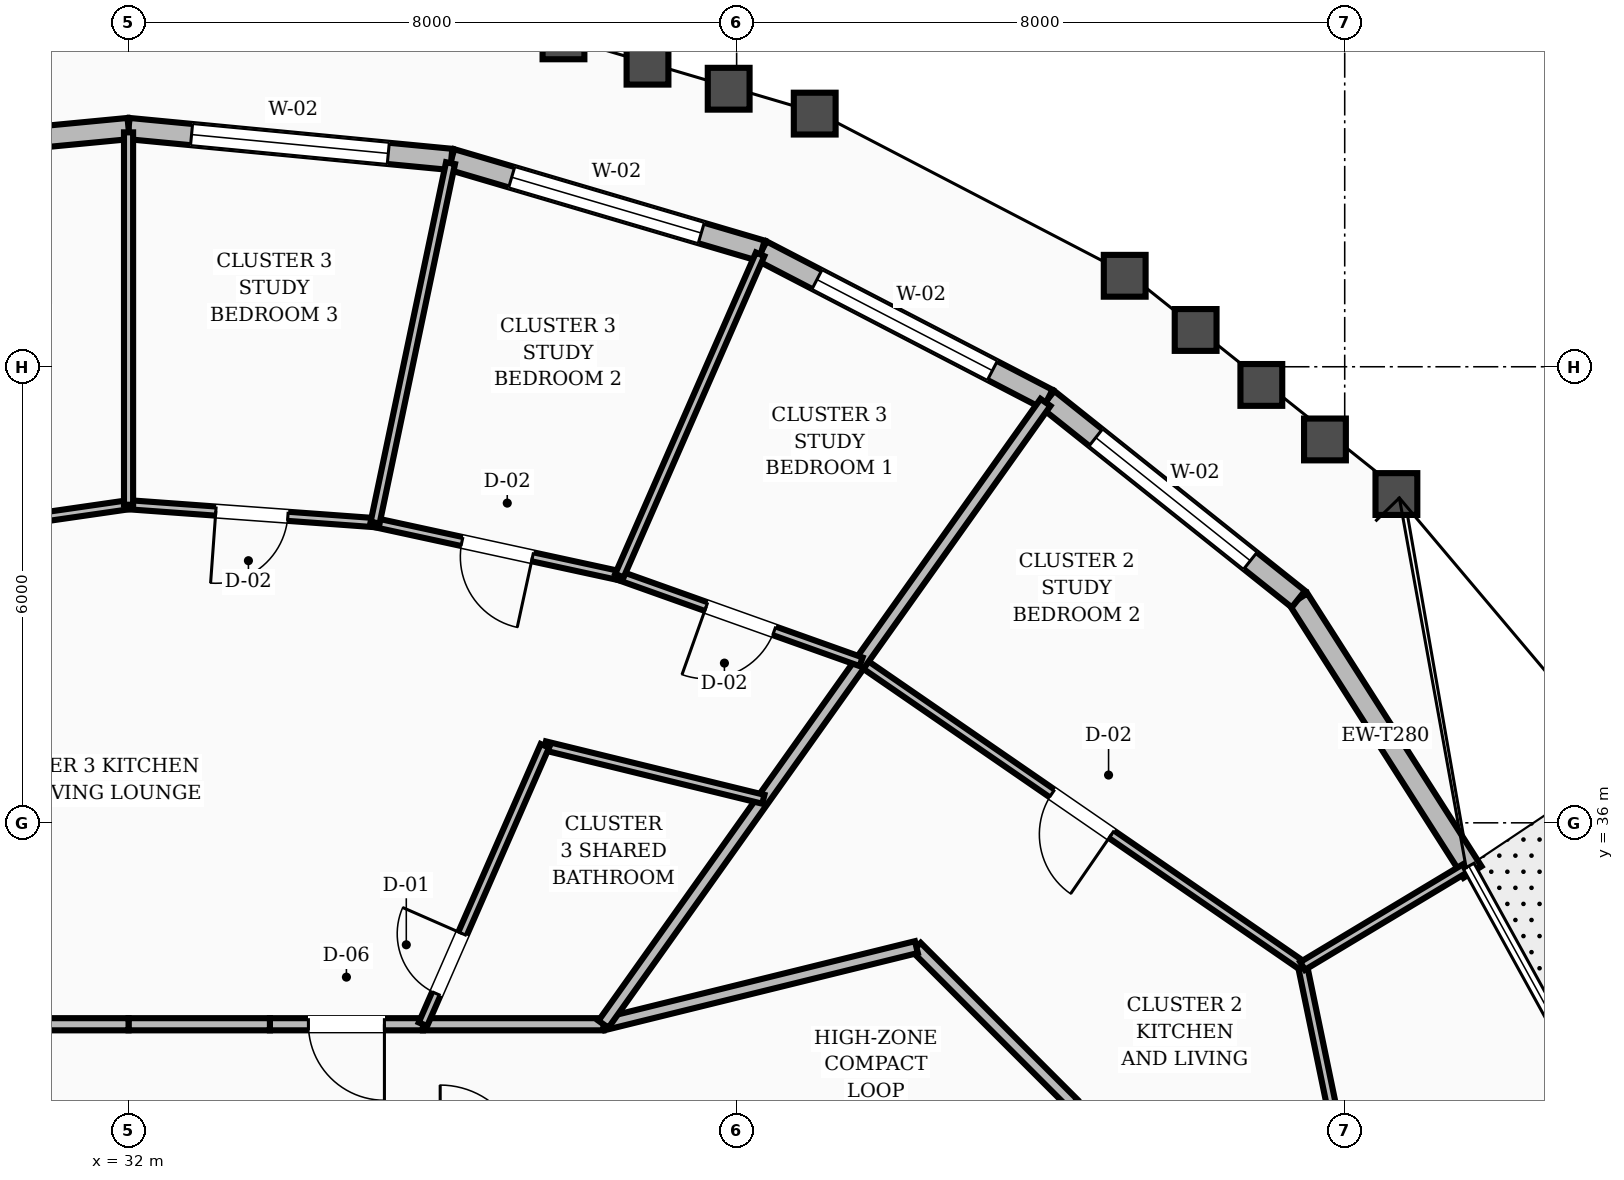
"""IFC4 building model, lengths in metres.
Left out: names, types, materials, properties, quantities, classifications, styles, units other than length and angle.
Written with IfcOpenShell. Run it as: python <this file> out.ifc"""

import sys

from ifc_helpers import new_model, si_unit, direction, frame, frame_2d, origin, place, context, subcontext, project, spatial, rectangle, extrude, element, fill, save


model = new_model("IFC4")
c1 = context("Model", 3, precision=1e-05, world=origin(), true_north=direction((0.0, 1.0)))
c2 = subcontext(c1, "Body", "Model", "MODEL_VIEW")
j1 = project(units=[si_unit("LENGTHUNIT", "METRE"), si_unit("PLANEANGLEUNIT", "RADIAN")], contexts=[c1])
p1 = place(None, origin())
s1 = spatial("IfcSite", under=j1, at=p1, CompositionType="ELEMENT")
p2 = place(p1, origin())
s2 = spatial("IfcBuilding", under=s1, at=p2, CompositionType="ELEMENT")
p3 = place(p2, frame((0.0, 0.0, 240.0)))
s3 = spatial("IfcBuildingStorey", under=s2, at=p3, CompositionType="ELEMENT", Elevation=240.0)
p4 = place(p3, frame((49.681, 35.353, 0.0), z_axis=(0.0, 0.0, 1.0), x_axis=(-0.537776362765, 0.843087530243, 0.0)))
e1 = element("IfcWall", 1, at=p4, inside=s3, PredefinedType="STANDARD", context=c2, shape_type="SweptSolid", body=[
    extrude(rectangle(XDim=4.26, YDim=0.28, at=frame_2d((2.13, 0.0))), origin(), (0.0, 0.0, 1.0), 2.88),
])
p5 = place(p3, frame((47.39, 38.944, 0.0), z_axis=(0.0, 0.0, 1.0), x_axis=(-0.782030895384, 0.623239663906, 0.0)))
e2 = element("IfcWall", 2, at=p5, inside=s3, PredefinedType="STANDARD", context=c2, shape_type="SweptSolid", body=[
    extrude(rectangle(XDim=4.217, YDim=0.28, at=frame_2d((2.109, 0.0))), origin(), (0.0, 0.0, 1.0), 2.88),
])
p6 = place(p5, frame((0.809, 0.0, 0.8)))
e3 = element("IfcOpeningElement", 3, at=p6, cuts=e2, PredefinedType="OPENING", context=c2, shape_type="SweptSolid", body=[
    extrude(rectangle(XDim=2.6, YDim=1.65, at=frame_2d((1.3, 0.825))), frame((0.0, 0.15, 0.0), z_axis=(0.0, -1.0, 0.0), x_axis=(1.0, 0.0, 0.0)), (0.0, 0.0, 1.0), 0.3),
])
p7 = place(p3, frame((44.092, 41.572, 0.0), z_axis=(0.0, 0.0, 1.0), x_axis=(-0.887588000353, 0.460638189504, 0.0)))
e4 = element("IfcWall", 4, at=p7, inside=s3, PredefinedType="STANDARD", context=c2, shape_type="SweptSolid", body=[
    extrude(rectangle(XDim=4.24, YDim=0.28, at=frame_2d((2.12, 0.0))), origin(), (0.0, 0.0, 1.0), 2.88),
])
p8 = place(p7, frame((0.82, 0.0, 0.8)))
e5 = element("IfcOpeningElement", 5, at=p8, cuts=e4, PredefinedType="OPENING", context=c2, shape_type="SweptSolid", body=[
    extrude(rectangle(XDim=2.6, YDim=1.65, at=frame_2d((1.3, 0.825))), frame((0.0, 0.15, 0.0), z_axis=(0.0, -1.0, 0.0), x_axis=(1.0, 0.0, 0.0)), (0.0, 0.0, 1.0), 0.3),
])
p9 = place(p3, frame((40.329, 43.525, 0.0), z_axis=(0.0, 0.0, 1.0), x_axis=(-0.95925857755, 0.28252961154, 0.0)))
e6 = element("IfcWall", 6, at=p9, inside=s3, PredefinedType="STANDARD", context=c2, shape_type="SweptSolid", body=[
    extrude(rectangle(XDim=4.257, YDim=0.28, at=frame_2d((2.128, 0.0))), origin(), (0.0, 0.0, 1.0), 2.88),
])
p10 = place(p9, frame((0.828, 0.0, 0.8)))
e7 = element("IfcOpeningElement", 7, at=p10, cuts=e6, PredefinedType="OPENING", context=c2, shape_type="SweptSolid", body=[
    extrude(rectangle(XDim=2.6, YDim=1.65, at=frame_2d((1.3, 0.825))), frame((0.0, 0.15, 0.0), z_axis=(0.0, -1.0, 0.0), x_axis=(1.0, 0.0, 0.0)), (0.0, 0.0, 1.0), 0.3),
])
p11 = place(p3, frame((36.246, 44.728, 0.0), z_axis=(0.0, 0.0, 1.0), x_axis=(-0.995459644973, 0.09518453252, 0.0)))
e8 = element("IfcWall", 8, at=p11, inside=s3, PredefinedType="STANDARD", context=c2, shape_type="SweptSolid", body=[
    extrude(rectangle(XDim=4.265, YDim=0.28, at=frame_2d((2.133, 0.0))), origin(), (0.0, 0.0, 1.0), 2.88),
])
p12 = place(p11, frame((0.833, 0.0, 0.8)))
e9 = element("IfcOpeningElement", 9, at=p12, cuts=e8, PredefinedType="OPENING", context=c2, shape_type="SweptSolid", body=[
    extrude(rectangle(XDim=2.6, YDim=1.65, at=frame_2d((1.3, 0.825))), frame((0.0, 0.15, 0.0), z_axis=(0.0, -1.0, 0.0), x_axis=(1.0, 0.0, 0.0)), (0.0, 0.0, 1.0), 0.3),
])
p13 = place(p3, frame((32.0, 45.134, 0.0), z_axis=(0.0, 0.0, 1.0), x_axis=(-0.995459644973, -0.09518453252, 0.0)))
e10 = element("IfcWall", 10, at=p13, inside=s3, PredefinedType="STANDARD", context=c2, shape_type="SweptSolid", body=[
    extrude(rectangle(XDim=4.265, YDim=0.28, at=frame_2d((2.133, 0.0))), origin(), (0.0, 0.0, 1.0), 2.88),
])
p14 = place(p3, frame((44.427, 32.303, 0.0), z_axis=(0.0, 0.0, 1.0), x_axis=(-0.707106781187, 0.707106781187, 0.0)))
e11 = element("IfcWall", 11, at=p14, inside=s3, PredefinedType="SOLIDWALL", context=c2, shape_type="SweptSolid", body=[
    extrude(rectangle(XDim=2.916, YDim=0.16, at=frame_2d((1.458, 0.0))), origin(), (0.0, 0.0, 1.0), 2.87),
])
p15 = place(p3, frame((42.365, 34.365, 0.0), z_axis=(0.0, 0.0, 1.0), x_axis=(-0.970939799552, -0.239323850978, 0.0)))
e12 = element("IfcWall", 12, at=p15, inside=s3, PredefinedType="SOLIDWALL", context=c2, shape_type="SweptSolid", body=[
    extrude(rectangle(XDim=4.241, YDim=0.16, at=frame_2d((2.12, 0.0))), origin(), (0.0, 0.0, 1.0), 2.87),
])
p16 = place(p3, frame((38.248, 33.35, 0.0), z_axis=(0.0, 0.0, 1.0), x_axis=(-1.0, 0.0, 0.0)))
e13 = element("IfcWall", 13, at=p16, inside=s3, PredefinedType="SOLIDWALL", context=c2, shape_type="SweptSolid", body=[
    extrude(rectangle(XDim=2.375, YDim=0.16, at=frame_2d((1.188, 0.0))), origin(), (0.0, 0.0, 1.0), 2.87),
])
p17 = place(p3, frame((35.873, 33.35, 0.0), z_axis=(0.0, 0.0, 1.0), x_axis=(-1.0, 0.0, 0.0)))
e14 = element("IfcWall", 14, at=p17, inside=s3, PredefinedType="SOLIDWALL", context=c2, shape_type="SweptSolid", body=[
    extrude(rectangle(XDim=2.013, YDim=0.16, at=frame_2d((1.006, 0.0))), origin(), (0.0, 0.0, 1.0), 2.87),
])
p18 = place(p17, frame((0.507, 0.0, 0.0)))
e15 = element("IfcOpeningElement", 15, at=p18, cuts=e14, PredefinedType="OPENING", context=c2, shape_type="SweptSolid", body=[
    extrude(rectangle(XDim=1.0, YDim=2.1, at=frame_2d((0.5, 1.05))), frame((0.0, 0.09, 0.0), z_axis=(0.0, -1.0, 0.0), x_axis=(1.0, 0.0, 0.0)), (0.0, 0.0, 1.0), 0.18),
])
for number, where, z_axis, x_axis in (
    (16, (33.86, 33.35, 0.0), (0.0, 0.0, 1.0), (-1.0, 0.0, 0.0)),
    (17, (32.0, 33.35, 0.0), (0.0, 0.0, 1.0), (-1.0, 0.0, 0.0)),
):
    element("IfcWall", number, at=place(p3, frame(where, z_axis=z_axis, x_axis=x_axis)), inside=s3, PredefinedType="SOLIDWALL", context=c2, shape_type="SweptSolid", body=[
        extrude(rectangle(XDim=1.86, YDim=0.16, at=frame_2d((0.93, 0.0))), origin(), (0.0, 0.0, 1.0), 2.87),
    ])
p19 = place(p3, frame((49.541, 24.0, 0.0), z_axis=(0.0, 0.0, 1.0), x_axis=(-0.202796260228, 0.979220954043, 0.0)))
e18 = element("IfcWall", 18, at=p19, inside=s3, PredefinedType="PARTITIONING", context=c2, shape_type="SweptSolid", body=[
    extrude(rectangle(XDim=10.332, YDim=0.12, at=frame_2d((5.166, 0.0))), origin(), (0.0, 0.0, 1.0), 2.87),
])
p20 = place(p19, frame((6.561, 0.0, 0.0)))
e19 = element("IfcOpeningElement", 19, at=p20, cuts=e18, PredefinedType="OPENING", context=c2, shape_type="SweptSolid", body=[
    extrude(rectangle(XDim=0.95, YDim=2.1, at=frame_2d((0.475, 1.05))), frame((0.0, 0.07, 0.0), z_axis=(0.0, -1.0, 0.0), x_axis=(1.0, 0.0, 0.0)), (0.0, 0.0, 1.0), 0.14),
])
p21 = place(p3, frame((47.446, 34.117, 0.0), z_axis=(0.0, 0.0, 1.0), x_axis=(-0.823453694919, 0.567383479072, 0.0)))
e20 = element("IfcWall", 20, at=p21, inside=s3, PredefinedType="PARTITIONING", context=c2, shape_type="SweptSolid", body=[
    extrude(rectangle(XDim=7.053, YDim=0.12, at=frame_2d((3.527, 0.0))), origin(), (0.0, 0.0, 1.0), 2.87),
])
p22 = place(p21, frame((3.052, 0.0, 0.0)))
e21 = element("IfcOpeningElement", 21, at=p22, cuts=e20, PredefinedType="OPENING", context=c2, shape_type="SweptSolid", body=[
    extrude(rectangle(XDim=0.95, YDim=2.1, at=frame_2d((0.475, 1.05))), frame((0.0, 0.07, 0.0), z_axis=(0.0, -1.0, 0.0), x_axis=(1.0, 0.0, 0.0)), (0.0, 0.0, 1.0), 0.14),
])
p23 = place(p3, frame((47.446, 34.117, 0.0), z_axis=(0.0, 0.0, 1.0), x_axis=(0.85718258358, 0.515012639075, 0.0)))
e22 = element("IfcWall", 22, at=p23, inside=s3, PredefinedType="PARTITIONING", context=c2, shape_type="SweptSolid", body=[
    extrude(rectangle(XDim=2.5, YDim=0.12, at=frame_2d((1.25, 0.0))), origin(), (0.0, 0.0, 1.0), 2.87),
])
p24 = place(p3, frame((38.248, 33.35, 0.0), z_axis=(0.0, 0.0, 1.0), x_axis=(0.579377676694, 0.815059205058, 0.0)))
e23 = element("IfcWall", 23, at=p24, inside=s3, PredefinedType="SOLIDWALL", context=c2, shape_type="SweptSolid", body=[
    extrude(rectangle(XDim=10.038, YDim=0.16, at=frame_2d((5.019, 0.0))), origin(), (0.0, 0.0, 1.0), 2.87),
])
p25 = place(p3, frame((40.352, 36.31, 0.0), z_axis=(0.0, 0.0, 1.0), x_axis=(-0.971357969052, 0.237620908084, 0.0)))
e24 = element("IfcWall", 24, at=p25, inside=s3, PredefinedType="PARTITIONING", context=c2, shape_type="SweptSolid", body=[
    extrude(rectangle(XDim=2.959, YDim=0.12, at=frame_2d((1.479, 0.0))), origin(), (0.0, 0.0, 1.0), 2.87),
])
p26 = place(p3, frame((35.873, 33.35, 0.0), z_axis=(0.0, 0.0, 1.0), x_axis=(0.401215916975, 0.915983508566, 0.0)))
e25 = element("IfcWall", 25, at=p26, inside=s3, PredefinedType="PARTITIONING", context=c2, shape_type="SweptSolid", body=[
    extrude(rectangle(XDim=3.999, YDim=0.12, at=frame_2d((2.0, 0.0))), origin(), (0.0, 0.0, 1.0), 2.87),
])
p27 = place(p26, frame((0.44, 0.0, 0.0)))
e26 = element("IfcOpeningElement", 26, at=p27, cuts=e25, PredefinedType="OPENING", context=c2, shape_type="SweptSolid", body=[
    extrude(rectangle(XDim=0.86, YDim=2.1, at=frame_2d((0.43, 1.05))), frame((0.0, 0.07, 0.0), z_axis=(0.0, -1.0, 0.0), x_axis=(1.0, 0.0, 0.0)), (0.0, 0.0, 1.0), 0.14),
])
p28 = place(p3, frame((41.637, 38.119, 0.0), z_axis=(0.0, 0.0, 1.0), x_axis=(-0.942011593526, 0.335580329671, 0.0)))
e27 = element("IfcWall", 27, at=p28, inside=s3, PredefinedType="PARTITIONING", context=c2, shape_type="SweptSolid", body=[
    extrude(rectangle(XDim=3.376, YDim=0.12, at=frame_2d((1.688, 0.0))), origin(), (0.0, 0.0, 1.0), 2.87),
])
p29 = place(p28, frame((1.213, 0.0, 0.0)))
e28 = element("IfcOpeningElement", 28, at=p29, cuts=e27, PredefinedType="OPENING", context=c2, shape_type="SweptSolid", body=[
    extrude(rectangle(XDim=0.95, YDim=2.1, at=frame_2d((0.475, 1.05))), frame((0.0, 0.07, 0.0), z_axis=(0.0, -1.0, 0.0), x_axis=(1.0, 0.0, 0.0)), (0.0, 0.0, 1.0), 0.14),
])
p30 = place(p3, frame((38.458, 39.252, 0.0), z_axis=(0.0, 0.0, 1.0), x_axis=(-0.977245996874, 0.21210907947, 0.0)))
e29 = element("IfcWall", 29, at=p30, inside=s3, PredefinedType="PARTITIONING", context=c2, shape_type="SweptSolid", body=[
    extrude(rectangle(XDim=3.288, YDim=0.12, at=frame_2d((1.644, 0.0))), origin(), (0.0, 0.0, 1.0), 2.87),
])
p31 = place(p30, frame((1.169, 0.0, 0.0)))
e30 = element("IfcOpeningElement", 30, at=p31, cuts=e29, PredefinedType="OPENING", context=c2, shape_type="SweptSolid", body=[
    extrude(rectangle(XDim=0.95, YDim=2.1, at=frame_2d((0.475, 1.05))), frame((0.0, 0.07, 0.0), z_axis=(0.0, -1.0, 0.0), x_axis=(1.0, 0.0, 0.0)), (0.0, 0.0, 1.0), 0.14),
])
p32 = place(p3, frame((38.458, 39.252, 0.0), z_axis=(0.0, 0.0, 1.0), x_axis=(0.401165666386, 0.916005517512, 0.0)))
e31 = element("IfcWall", 31, at=p32, inside=s3, PredefinedType="PARTITIONING", context=c2, shape_type="SweptSolid", body=[
    extrude(rectangle(XDim=4.615, YDim=0.12, at=frame_2d((2.308, 0.0))), origin(), (0.0, 0.0, 1.0), 2.87),
])
p33 = place(p3, frame((35.244, 39.949, 0.0), z_axis=(0.0, 0.0, 1.0), x_axis=(-0.997373019742, 0.072436589452, 0.0)))
e32 = element("IfcWall", 32, at=p33, inside=s3, PredefinedType="PARTITIONING", context=c2, shape_type="SweptSolid", body=[
    extrude(rectangle(XDim=3.252, YDim=0.12, at=frame_2d((1.626, 0.0))), origin(), (0.0, 0.0, 1.0), 2.87),
])
p34 = place(p33, frame((1.151, 0.0, 0.0)))
e33 = element("IfcOpeningElement", 33, at=p34, cuts=e32, PredefinedType="OPENING", context=c2, shape_type="SweptSolid", body=[
    extrude(rectangle(XDim=0.95, YDim=2.1, at=frame_2d((0.475, 1.05))), frame((0.0, 0.07, 0.0), z_axis=(0.0, -1.0, 0.0), x_axis=(1.0, 0.0, 0.0)), (0.0, 0.0, 1.0), 0.14),
])
p35 = place(p3, frame((35.244, 39.949, 0.0), z_axis=(0.0, 0.0, 1.0), x_axis=(0.205259333171, 0.978707620358, 0.0)))
e34 = element("IfcWall", 34, at=p35, inside=s3, PredefinedType="PARTITIONING", context=c2, shape_type="SweptSolid", body=[
    extrude(rectangle(XDim=4.833, YDim=0.12, at=frame_2d((2.416, 0.0))), origin(), (0.0, 0.0, 1.0), 2.87),
])
p36 = place(p3, frame((32.0, 40.185, 0.0), z_axis=(0.0, 0.0, 1.0), x_axis=(-0.989720707907, -0.143013706829, 0.0)))
e35 = element("IfcWall", 35, at=p36, inside=s3, PredefinedType="PARTITIONING", context=c2, shape_type="SweptSolid", body=[
    extrude(rectangle(XDim=6.525, YDim=0.12, at=frame_2d((3.262, 0.0))), origin(), (0.0, 0.0, 1.0), 2.87),
])
p37 = place(p36, frame((2.787, 0.0, 0.0)))
e36 = element("IfcOpeningElement", 36, at=p37, cuts=e35, PredefinedType="OPENING", context=c2, shape_type="SweptSolid", body=[
    extrude(rectangle(XDim=0.95, YDim=2.1, at=frame_2d((0.475, 1.05))), frame((0.0, 0.07, 0.0), z_axis=(0.0, -1.0, 0.0), x_axis=(1.0, 0.0, 0.0)), (0.0, 0.0, 1.0), 0.14),
])
p38 = place(p3, frame((32.0, 40.185, 0.0), z_axis=(0.0, 0.0, 1.0), x_axis=(0.0, 1.0, 0.0)))
e37 = element("IfcWall", 37, at=p38, inside=s3, PredefinedType="PARTITIONING", context=c2, shape_type="SweptSolid", body=[
    extrude(rectangle(XDim=4.899, YDim=0.12, at=frame_2d((2.45, 0.0))), origin(), (0.0, 0.0, 1.0), 2.87),
])
p39 = place(p6, origin())
e38 = element("IfcWindow", 38, at=p39, inside=s3, PartitioningType="SINGLE_PANEL", PredefinedType="WINDOW", context=c2, shape_type="SweptSolid", body=[
    extrude(rectangle(XDim=2.6, YDim=1.65, at=frame_2d((1.3, 0.825))), frame((0.0, 0.03, 0.0), z_axis=(0.0, -1.0, 0.0), x_axis=(1.0, 0.0, 0.0)), (0.0, 0.0, 1.0), 0.06),
])
fill(e3, e38)
p40 = place(p8, origin())
e39 = element("IfcWindow", 39, at=p40, inside=s3, PartitioningType="SINGLE_PANEL", PredefinedType="WINDOW", context=c2, shape_type="SweptSolid", body=[
    extrude(rectangle(XDim=2.6, YDim=1.65, at=frame_2d((1.3, 0.825))), frame((0.0, 0.03, 0.0), z_axis=(0.0, -1.0, 0.0), x_axis=(1.0, 0.0, 0.0)), (0.0, 0.0, 1.0), 0.06),
])
fill(e5, e39)
p41 = place(p10, origin())
e40 = element("IfcWindow", 40, at=p41, inside=s3, PartitioningType="SINGLE_PANEL", PredefinedType="WINDOW", context=c2, shape_type="SweptSolid", body=[
    extrude(rectangle(XDim=2.6, YDim=1.65, at=frame_2d((1.3, 0.825))), frame((0.0, 0.03, 0.0), z_axis=(0.0, -1.0, 0.0), x_axis=(1.0, 0.0, 0.0)), (0.0, 0.0, 1.0), 0.06),
])
fill(e7, e40)
p42 = place(p12, origin())
e41 = element("IfcWindow", 41, at=p42, inside=s3, PartitioningType="SINGLE_PANEL", PredefinedType="WINDOW", context=c2, shape_type="SweptSolid", body=[
    extrude(rectangle(XDim=2.6, YDim=1.65, at=frame_2d((1.3, 0.825))), frame((0.0, 0.03, 0.0), z_axis=(0.0, -1.0, 0.0), x_axis=(1.0, 0.0, 0.0)), (0.0, 0.0, 1.0), 0.06),
])
fill(e9, e41)
p43 = place(p22, origin())
e42 = element("IfcDoor", 42, at=p43, inside=s3, OperationType="SINGLE_SWING_LEFT", PredefinedType="DOOR", context=c2, shape_type="SweptSolid", body=[
    extrude(rectangle(XDim=0.95, YDim=2.1, at=frame_2d((0.475, 1.05))), frame((0.0, 0.025, 0.0), z_axis=(0.0, -1.0, 0.0), x_axis=(1.0, 0.0, 0.0)), (0.0, 0.0, 1.0), 0.05),
])
fill(e21, e42)
p44 = place(p27, origin())
e43 = element("IfcDoor", 43, at=p44, inside=s3, OperationType="SINGLE_SWING_RIGHT", PredefinedType="DOOR", context=c2, shape_type="SweptSolid", body=[
    extrude(rectangle(XDim=0.86, YDim=2.1, at=frame_2d((0.43, 1.05))), frame((0.0, 0.025, 0.0), z_axis=(0.0, -1.0, 0.0), x_axis=(1.0, 0.0, 0.0)), (0.0, 0.0, 1.0), 0.05),
])
fill(e26, e43)
p45 = place(p18, origin())
e44 = element("IfcDoor", 44, at=p45, inside=s3, OperationType="SINGLE_SWING_LEFT", PredefinedType="DOOR", context=c2, shape_type="SweptSolid", body=[
    extrude(rectangle(XDim=1.0, YDim=2.1, at=frame_2d((0.5, 1.05))), frame((0.0, 0.025, 0.0), z_axis=(0.0, -1.0, 0.0), x_axis=(1.0, 0.0, 0.0)), (0.0, 0.0, 1.0), 0.05),
])
fill(e15, e44)
p46 = place(p29, origin())
e45 = element("IfcDoor", 45, at=p46, inside=s3, OperationType="SINGLE_SWING_RIGHT", PredefinedType="DOOR", context=c2, shape_type="SweptSolid", body=[
    extrude(rectangle(XDim=0.95, YDim=2.1, at=frame_2d((0.475, 1.05))), frame((0.0, 0.025, 0.0), z_axis=(0.0, -1.0, 0.0), x_axis=(1.0, 0.0, 0.0)), (0.0, 0.0, 1.0), 0.05),
])
fill(e28, e45)
p47 = place(p31, origin())
e46 = element("IfcDoor", 46, at=p47, inside=s3, OperationType="SINGLE_SWING_LEFT", PredefinedType="DOOR", context=c2, shape_type="SweptSolid", body=[
    extrude(rectangle(XDim=0.95, YDim=2.1, at=frame_2d((0.475, 1.05))), frame((0.0, 0.025, 0.0), z_axis=(0.0, -1.0, 0.0), x_axis=(1.0, 0.0, 0.0)), (0.0, 0.0, 1.0), 0.05),
])
fill(e30, e46)
p48 = place(p34, origin())
e47 = element("IfcDoor", 47, at=p48, inside=s3, OperationType="SINGLE_SWING_RIGHT", PredefinedType="DOOR", context=c2, shape_type="SweptSolid", body=[
    extrude(rectangle(XDim=0.95, YDim=2.1, at=frame_2d((0.475, 1.05))), frame((0.0, 0.025, 0.0), z_axis=(0.0, -1.0, 0.0), x_axis=(1.0, 0.0, 0.0)), (0.0, 0.0, 1.0), 0.05),
])
fill(e33, e47)
save(model, sys.argv[1])
